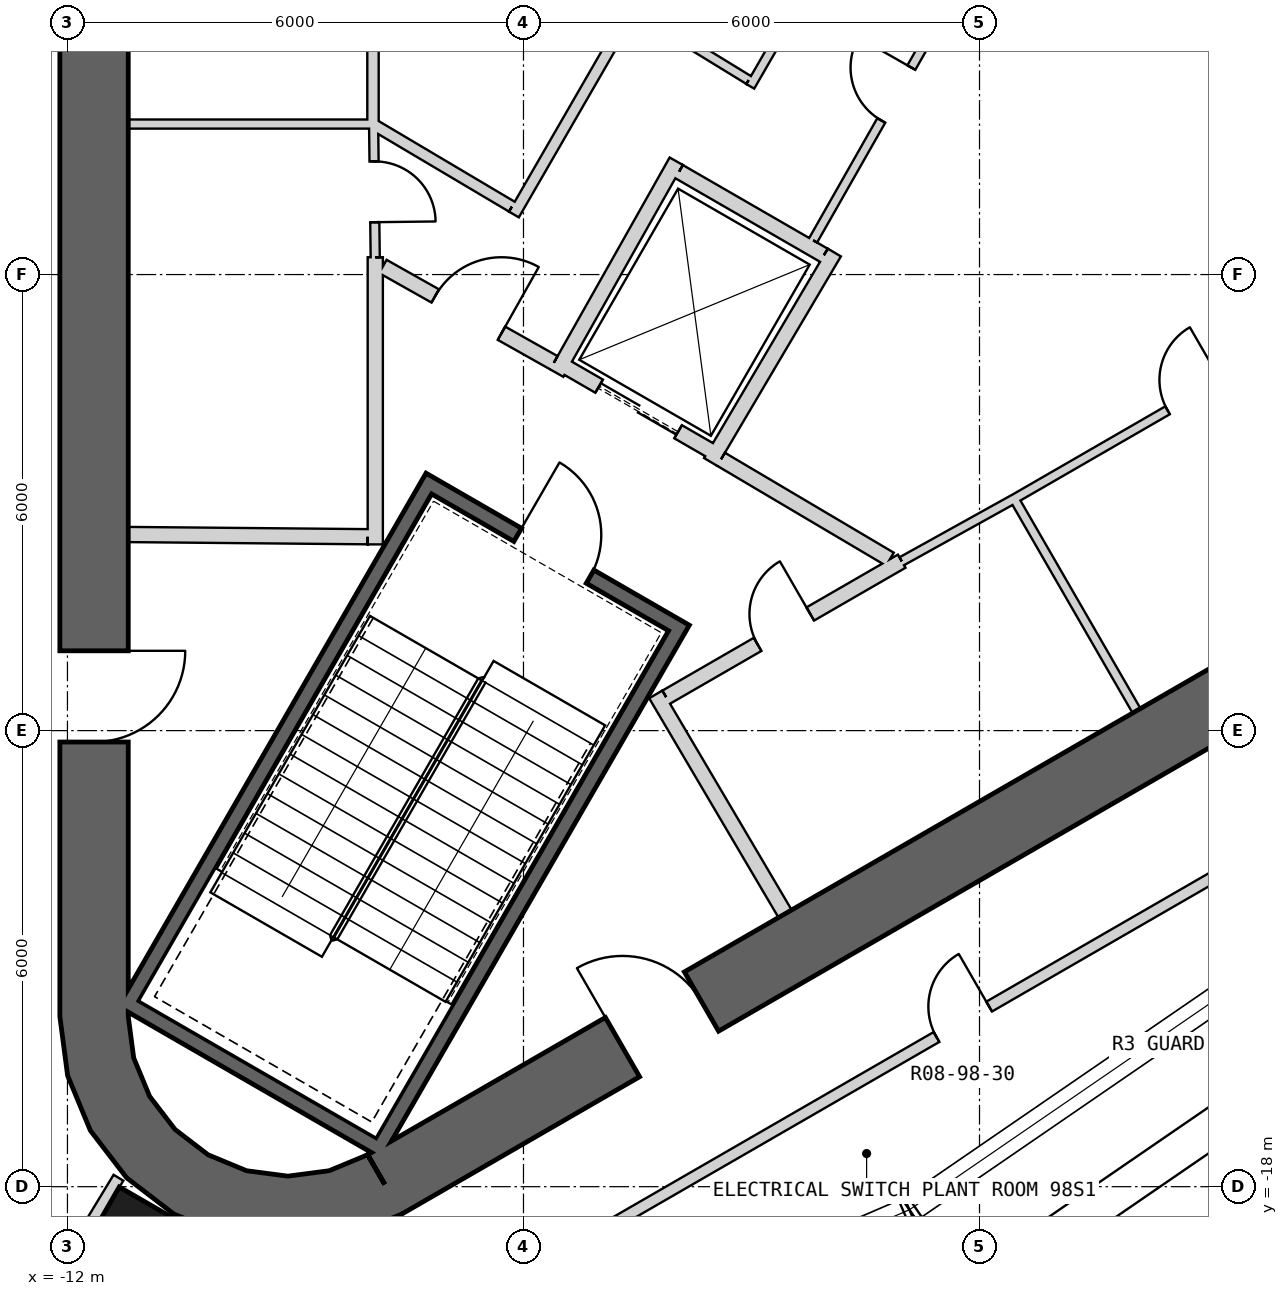
"""IFC4 building model, lengths in metres.
Left out: names, types, materials, properties, quantities, classifications, styles, units other than length and angle.
Written with IfcOpenShell. Run it as: python <this file> out.ifc"""

import sys

from ifc_helpers import new_model, si_unit, direction, frame, frame_2d, origin, origin_2d, place, context, subcontext, project, spatial, polyline, rectangle, outline, extrude, element, fill, save


model = new_model("IFC4")
c1 = context("Model", 3, precision=1e-05, world=origin(), true_north=direction((0.0, 1.0)))
c2 = subcontext(c1, "Body", "Model", "MODEL_VIEW")
j1 = project(units=[si_unit("LENGTHUNIT", "METRE"), si_unit("PLANEANGLEUNIT", "RADIAN")], contexts=[c1])
p1 = place(None, origin())
s1 = spatial("IfcSite", under=j1, at=p1, CompositionType="ELEMENT")
p2 = place(p1, origin())
s2 = spatial("IfcBuilding", under=s1, at=p2, CompositionType="ELEMENT")
p3 = place(p2, frame((0.0, 0.0, 435.3)))
s3 = spatial("IfcBuildingStorey", under=s2, at=p3, CompositionType="ELEMENT", Elevation=435.3)
p4 = place(p3, frame((-11.025, -19.097, 0.0), z_axis=(0.0, 0.0, 1.0), x_axis=(-0.5, -0.866025403784, 0.0)))
e1 = element("IfcColumn", 1, at=p4, inside=s3, PredefinedType="COLUMN", context=c2, shape_type="SweptSolid", body=[
    extrude(rectangle(XDim=1.6, YDim=1.6, at=origin_2d()), origin(), (0.0, 0.0, 1.0), 5.0),
])
p5 = place(p3, frame((-11.65, 15.762, 0.0), z_axis=(0.0, 0.0, 1.0), x_axis=(0.0, -1.0, 0.0)))
e2 = element("IfcWall", 2, at=p5, inside=s3, PredefinedType="SHEAR", context=c2, shape_type="SweptSolid", body=[
    extrude(rectangle(XDim=31.523, YDim=0.9, at=frame_2d((15.762, 0.0))), origin(), (0.0, 0.0, 1.0), 5.0),
])
p6 = place(p5, frame((3.612, 0.0, 0.0)))
e3 = element("IfcOpeningElement", 3, at=p6, cuts=e2, PredefinedType="OPENING", context=c2, shape_type="SweptSolid", body=[
    extrude(rectangle(XDim=1.2, YDim=2.4, at=frame_2d((0.6, 1.2))), frame((0.0, 0.46, 0.0), z_axis=(0.0, -1.0, 0.0), x_axis=(1.0, 0.0, 0.0)), (0.0, 0.0, 1.0), 0.92),
])
p7 = place(p5, frame((26.712, 0.0, 0.0)))
e4 = element("IfcOpeningElement", 4, at=p7, cuts=e2, PredefinedType="OPENING", context=c2, shape_type="SweptSolid", body=[
    extrude(rectangle(XDim=1.2, YDim=2.4, at=frame_2d((0.6, 1.2))), frame((0.0, 0.46, 0.0), z_axis=(0.0, -1.0, 0.0), x_axis=(1.0, 0.0, 0.0)), (0.0, 0.0, 1.0), 0.92),
])
p8 = place(p3, frame((-7.825, -17.97, 0.0), z_axis=(0.0, 0.0, 1.0), x_axis=(0.866028369851, 0.499994862586, 0.0)))
e5 = element("IfcWall", 5, at=p8, inside=s3, PredefinedType="SHEAR", context=c2, shape_type="SweptSolid", body=[
    extrude(rectangle(XDim=31.523, YDim=0.9, at=frame_2d((15.762, 0.0))), origin(), (0.0, 0.0, 1.0), 5.0),
])
p9 = place(p8, frame((17.862, 0.0, 0.0)))
e6 = element("IfcOpeningElement", 6, at=p9, cuts=e5, PredefinedType="OPENING", context=c2, shape_type="SweptSolid", body=[
    extrude(rectangle(XDim=1.2, YDim=2.4, at=frame_2d((0.6, 1.2))), frame((0.0, 0.46, 0.0), z_axis=(0.0, -1.0, 0.0), x_axis=(1.0, 0.0, 0.0)), (0.0, 0.0, 1.0), 0.92),
])
p10 = place(p8, frame((20.562, 0.0, 0.0)))
e7 = element("IfcOpeningElement", 7, at=p10, cuts=e5, PredefinedType="OPENING", context=c2, shape_type="SweptSolid", body=[
    extrude(rectangle(XDim=1.2, YDim=2.4, at=frame_2d((0.6, 1.2))), frame((0.0, 0.46, 0.0), z_axis=(0.0, -1.0, 0.0), x_axis=(1.0, 0.0, 0.0)), (0.0, 0.0, 1.0), 0.92),
])
p11 = place(p8, frame((26.712, 0.0, 0.0)))
e8 = element("IfcOpeningElement", 8, at=p11, cuts=e5, PredefinedType="OPENING", context=c2, shape_type="SweptSolid", body=[
    extrude(rectangle(XDim=1.2, YDim=2.4, at=frame_2d((0.6, 1.2))), frame((0.0, 0.46, 0.0), z_axis=(0.0, -1.0, 0.0), x_axis=(1.0, 0.0, 0.0)), (0.0, 0.0, 1.0), 0.92),
])
p12 = place(p8, frame((3.612, 0.0, 0.0)))
e9 = element("IfcOpeningElement", 9, at=p12, cuts=e5, PredefinedType="OPENING", context=c2, shape_type="SweptSolid", body=[
    extrude(rectangle(XDim=1.2, YDim=2.4, at=frame_2d((0.6, 1.2))), frame((0.0, 0.46, 0.0), z_axis=(0.0, -1.0, 0.0), x_axis=(1.0, 0.0, 0.0)), (0.0, 0.0, 1.0), 0.92),
])
p13 = place(p3, origin())
e10 = element("IfcWall", 10, at=p13, inside=s3, PredefinedType="SHEAR", context=c2, shape_type="SweptSolid", body=[
    extrude(outline(polyline([(-12.1, -15.762), (-11.998, -16.538), (-11.698, -17.262), (-11.221, -17.883), (-10.6, -18.36), (-9.876, -18.659), (-9.1, -18.762), (-8.323, -18.659), (-7.6, -18.36), (-8.05, -17.58), (-8.556, -17.79), (-9.1, -17.862), (-9.644, -17.79), (-10.15, -17.58), (-10.585, -17.247), (-10.919, -16.812), (-11.128, -16.305), (-11.2, -15.762), (-12.1, -15.762)])), origin(), (0.0, 0.0, 1.0), 5.0),
])
p14 = place(p3, frame((-3.905, -10.563, -0.25), z_axis=(0.0, 0.0, 1.0), x_axis=(-0.500012932018, -0.866017937352, 0.0)))
e11 = element("IfcWall", 11, at=p14, inside=s3, PredefinedType="SHEAR", context=c2, shape_type="SweptSolid", body=[
    extrude(rectangle(XDim=8.1, YDim=0.2, at=frame_2d((4.05, 0.0))), origin(), (0.0, 0.0, 1.0), 5.0),
])
p15 = place(p3, frame((-11.282, -15.541, -0.25), z_axis=(0.0, 0.0, 1.0), x_axis=(0.866000483506, -0.500043160704, 0.0)))
e12 = element("IfcWall", 12, at=p15, inside=s3, PredefinedType="SHEAR", context=c2, shape_type="SweptSolid", body=[
    extrude(rectangle(XDim=3.8, YDim=0.2, at=frame_2d((1.9, 0.0))), origin(), (0.0, 0.0, 1.0), 5.0),
])
p16 = place(p3, frame((-7.196, -8.663, -0.25), z_axis=(0.0, 0.0, 1.0), x_axis=(-0.499997992926, -0.866026562566, 0.0)))
e13 = element("IfcWall", 13, at=p16, inside=s3, PredefinedType="SHEAR", context=c2, shape_type="SweptSolid", body=[
    extrude(rectangle(XDim=7.9, YDim=0.2, at=frame_2d((3.95, 0.0))), origin(), (0.0, 0.0, 1.0), 5.0),
])
p17 = place(p3, frame((-4.041, -10.599, -0.25), z_axis=(0.0, 0.0, 1.0), x_axis=(-0.866047807691, 0.499961193289, 0.0)))
e14 = element("IfcWall", 14, at=p17, inside=s3, PredefinedType="SHEAR", context=c2, shape_type="SweptSolid", body=[
    extrude(rectangle(XDim=3.6, YDim=0.2, at=frame_2d((1.8, 0.0))), origin(), (0.0, 0.0, 1.0), 5.0),
])
p18 = place(p17, frame((1.25, 0.0, 0.25)))
e15 = element("IfcOpeningElement", 15, at=p18, cuts=e14, PredefinedType="OPENING", context=c2, shape_type="SweptSolid", body=[
    extrude(rectangle(XDim=1.1, YDim=2.1, at=frame_2d((0.55, 1.05))), frame((0.0, 0.11, 0.0), z_axis=(0.0, -1.0, 0.0), x_axis=(1.0, 0.0, 0.0)), (0.0, 0.0, 1.0), 0.22),
])
p19 = place(p3, frame((-3.446, -8.368, 0.0), z_axis=(0.0, 0.0, 1.0), x_axis=(-0.866024647952, 0.500001309137, 0.0)))
e16 = element("IfcWall", 16, at=p19, inside=s3, PredefinedType="PLUMBINGWALL", context=c2, shape_type="SweptSolid", body=[
    extrude(rectangle(XDim=2.4, YDim=0.2, at=frame_2d((1.2, 0.0))), origin(), (0.0, 0.0, 1.0), 4.75),
])
p20 = place(p19, frame((0.6, 0.0, 0.0)))
e17 = element("IfcOpeningElement", 17, at=p20, cuts=e16, PredefinedType="OPENING", context=c2, shape_type="SweptSolid", body=[
    extrude(rectangle(XDim=1.2, YDim=2.4, at=frame_2d((0.6, 1.2))), frame((0.0, 0.11, 0.0), z_axis=(0.0, -1.0, 0.0), x_axis=(1.0, 0.0, 0.0)), (0.0, 0.0, 1.0), 0.22),
])
p21 = place(p3, frame((-3.953, -4.646, 0.0), z_axis=(0.0, 0.0, 1.0), x_axis=(0.86605622881, -0.499946605688, 0.0)))
e18 = element("IfcWall", 18, at=p21, inside=s3, PredefinedType="PLUMBINGWALL", context=c2, shape_type="SweptSolid", body=[
    extrude(rectangle(XDim=2.2, YDim=0.2, at=frame_2d((1.1, 0.0))), origin(), (0.0, 0.0, 1.0), 4.75),
])
p22 = place(p3, frame((-1.91, -5.71, 0.0), z_axis=(0.0, 0.0, 1.0), x_axis=(-0.508616218331, -0.860993346345, 0.0)))
e19 = element("IfcWall", 19, at=p22, inside=s3, PredefinedType="PLUMBINGWALL", context=c2, shape_type="SweptSolid", body=[
    extrude(rectangle(XDim=3.2, YDim=0.2, at=frame_2d((1.6, 0.0))), origin(), (0.0, 0.0, 1.0), 4.75),
])
p23 = place(p3, frame((-3.99, -4.509, 0.0), z_axis=(0.0, 0.0, 1.0), x_axis=(-0.491358283181, -0.870957540612, 0.0)))
e20 = element("IfcWall", 20, at=p23, inside=s3, PredefinedType="PLUMBINGWALL", context=c2, shape_type="SweptSolid", body=[
    extrude(rectangle(XDim=3.2, YDim=0.2, at=frame_2d((1.6, 0.0))), origin(), (0.0, 0.0, 1.0), 4.75),
])
p24 = place(p3, frame((-7.95, -9.55, 0.0), z_axis=(0.0, 0.0, 1.0), x_axis=(0.0, 1.0, 0.0)))
e21 = element("IfcWall", 21, at=p24, inside=s3, PredefinedType="PARTITIONING", context=c2, shape_type="SweptSolid", body=[
    extrude(rectangle(XDim=3.778, YDim=0.2, at=frame_2d((1.889, 0.0))), origin(), (0.0, 0.0, 1.0), 4.75),
])
p25 = place(p3, frame((-7.98, 4.05, 0.0), z_axis=(0.0, 0.0, 1.0), x_axis=(0.0, -1.0, 0.0)))
e22 = element("IfcWall", 22, at=p25, inside=s3, PredefinedType="PLUMBINGWALL", context=c2, shape_type="SweptSolid", body=[
    extrude(rectangle(XDim=8.1, YDim=0.15, at=frame_2d((4.05, 0.0))), origin(), (0.0, 0.0, 1.0), 4.75),
])
p26 = place(p25, frame((2.3, 0.0, 0.0)))
e23 = element("IfcOpeningElement", 23, at=p26, cuts=e22, PredefinedType="OPENING", context=c2, shape_type="SweptSolid", body=[
    extrude(rectangle(XDim=0.8, YDim=2.1, at=frame_2d((0.4, 1.05))), frame((0.0, 0.085, 0.0), z_axis=(0.0, -1.0, 0.0), x_axis=(1.0, 0.0, 0.0)), (0.0, 0.0, 1.0), 0.17),
])
p27 = place(p3, frame((-7.95, -4.02, 0.0), z_axis=(0.0, 0.0, 1.0), x_axis=(-1.0, 0.0, 0.0)))
e24 = element("IfcWall", 24, at=p27, inside=s3, PredefinedType="PARTITIONING", context=c2, shape_type="SweptSolid", body=[
    extrude(rectangle(XDim=3.25, YDim=0.12, at=frame_2d((1.625, 0.0))), origin(), (0.0, 0.0, 1.0), 4.75),
])
p28 = place(p3, frame((-11.2, -9.42, 0.0), z_axis=(0.0, 0.0, 1.0), x_axis=(0.999957467379, -0.009222983926, 0.0)))
e25 = element("IfcWall", 25, at=p28, inside=s3, PredefinedType="PARTITIONING", context=c2, shape_type="SweptSolid", body=[
    extrude(rectangle(XDim=3.15, YDim=0.2, at=frame_2d((1.575, 0.0))), origin(), (0.0, 0.0, 1.0), 4.75),
])
p29 = place(p3, frame((-7.951, -5.772, 0.0), z_axis=(0.0, 0.0, 1.0), x_axis=(-0.012047318415, 0.999927428426, 0.0)))
e26 = element("IfcWall", 26, at=p29, inside=s3, PredefinedType="PARTITIONING", context=c2, shape_type="SweptSolid", body=[
    extrude(rectangle(XDim=1.723, YDim=0.12, at=frame_2d((0.861, 0.0))), origin(), (0.0, 0.0, 1.0), 4.75),
])
p30 = place(p29, frame((0.461, 0.0, 0.0)))
e27 = element("IfcOpeningElement", 27, at=p30, cuts=e26, PredefinedType="OPENING", context=c2, shape_type="SweptSolid", body=[
    extrude(rectangle(XDim=0.8, YDim=2.1, at=frame_2d((0.4, 1.05))), frame((0.0, 0.07, 0.0), z_axis=(0.0, -1.0, 0.0), x_axis=(1.0, 0.0, 0.0)), (0.0, 0.0, 1.0), 0.14),
])
p31 = place(p3, frame((2.067, -11.74, 0.0), z_axis=(0.0, 0.0, 1.0), x_axis=(-0.499984717929, 0.866034226713, 0.0)))
e28 = element("IfcWall", 28, at=p31, inside=s3, PredefinedType="PARTITIONING", context=c2, shape_type="SweptSolid", body=[
    extrude(rectangle(XDim=3.25, YDim=0.12, at=frame_2d((1.625, 0.0))), origin(), (0.0, 0.0, 1.0), 4.75),
])
p32 = place(p3, frame((-4.26, -11.524, 0.0), z_axis=(0.0, 0.0, 1.0), x_axis=(0.507997497166, -0.861358544901, 0.0)))
e29 = element("IfcWall", 29, at=p32, inside=s3, PredefinedType="PARTITIONING", context=c2, shape_type="SweptSolid", body=[
    extrude(rectangle(XDim=3.35, YDim=0.2, at=frame_2d((1.675, 0.0))), origin(), (0.0, 0.0, 1.0), 4.75),
])
p33 = place(p3, frame((-1.024, -9.771, 0.0), z_axis=(0.0, 0.0, 1.0), x_axis=(-0.866029903013, -0.499992207027, 0.0)))
e30 = element("IfcWall", 30, at=p33, inside=s3, PredefinedType="PARTITIONING", context=c2, shape_type="SweptSolid", body=[
    extrude(rectangle(XDim=3.578, YDim=0.2, at=frame_2d((1.789, 0.0))), origin(), (0.0, 0.0, 1.0), 4.75),
])
p34 = place(p33, frame((1.389, 0.0, 0.0)))
e31 = element("IfcOpeningElement", 31, at=p34, cuts=e30, PredefinedType="OPENING", context=c2, shape_type="SweptSolid", body=[
    extrude(rectangle(XDim=0.8, YDim=2.1, at=frame_2d((0.4, 1.05))), frame((0.0, 0.11, 0.0), z_axis=(0.0, -1.0, 0.0), x_axis=(1.0, 0.0, 0.0)), (0.0, 0.0, 1.0), 0.22),
])
p35 = place(p3, frame((-1.023, -9.772, 0.0), z_axis=(0.0, 0.0, 1.0), x_axis=(0.874290944206, 0.485402250592, 0.0)))
e32 = element("IfcWall", 32, at=p35, inside=s3, PredefinedType="PARTITIONING", context=c2, shape_type="SweptSolid", body=[
    extrude(rectangle(XDim=1.723, YDim=0.12, at=frame_2d((0.861, 0.0))), origin(), (0.0, 0.0, 1.0), 4.75),
])
p36 = place(p3, frame((0.483, -8.936, 0.0), z_axis=(0.0, 0.0, 1.0), x_axis=(0.866028230842, 0.499995103361, 0.0)))
e33 = element("IfcWall", 33, at=p36, inside=s3, PredefinedType="PARTITIONING", context=c2, shape_type="SweptSolid", body=[
    extrude(rectangle(XDim=5.4, YDim=0.12, at=frame_2d((2.7, 0.0))), origin(), (0.0, 0.0, 1.0), 4.75),
])
p37 = place(p36, frame((2.3, 0.0, 0.0)))
e34 = element("IfcOpeningElement", 34, at=p37, cuts=e33, PredefinedType="OPENING", context=c2, shape_type="SweptSolid", body=[
    extrude(rectangle(XDim=0.8, YDim=2.1, at=frame_2d((0.4, 1.05))), frame((0.0, 0.07, 0.0), z_axis=(0.0, -1.0, 0.0), x_axis=(1.0, 0.0, 0.0)), (0.0, 0.0, 1.0), 0.14),
])
p38 = place(p3, frame((-3.401, -8.43, 0.0), z_axis=(0.0, 0.0, 1.0), x_axis=(0.860630814782, -0.509229418482, 0.0)))
e35 = element("IfcWall", 35, at=p38, inside=s3, PredefinedType="PARTITIONING", context=c2, shape_type="SweptSolid", body=[
    extrude(rectangle(XDim=2.582, YDim=0.2, at=frame_2d((1.291, 0.0))), origin(), (0.0, 0.0, 1.0), 4.75),
])
p39 = place(p3, frame((-7.85, -5.893, 0.0), z_axis=(0.0, 0.0, 1.0), x_axis=(0.871350695252, -0.490660744185, 0.0)))
e36 = element("IfcWall", 36, at=p39, inside=s3, PredefinedType="PARTITIONING", context=c2, shape_type="SweptSolid", body=[
    extrude(rectangle(XDim=2.582, YDim=0.2, at=frame_2d((1.291, 0.0))), origin(), (0.0, 0.0, 1.0), 4.75),
])
p40 = place(p39, frame((0.791, 0.0, 0.0)))
e37 = element("IfcOpeningElement", 37, at=p40, cuts=e36, PredefinedType="OPENING", context=c2, shape_type="SweptSolid", body=[
    extrude(rectangle(XDim=1.0, YDim=2.1, at=frame_2d((0.5, 1.05))), frame((0.0, 0.11, 0.0), z_axis=(0.0, -1.0, 0.0), x_axis=(1.0, 0.0, 0.0)), (0.0, 0.0, 1.0), 0.22),
])
p41 = place(p3, frame((0.051, -1.611, 0.0), z_axis=(0.0, 0.0, 1.0), x_axis=(-0.49434454467, -0.869266053148, 0.0)))
e38 = element("IfcWall", 38, at=p41, inside=s3, PredefinedType="PARTITIONING", context=c2, shape_type="SweptSolid", body=[
    extrude(rectangle(XDim=4.53, YDim=0.12, at=frame_2d((2.265, 0.0))), origin(), (0.0, 0.0, 1.0), 4.75),
])
p42 = place(p41, frame((1.916, 0.0, 0.0)))
e39 = element("IfcOpeningElement", 39, at=p42, cuts=e38, PredefinedType="OPENING", context=c2, shape_type="SweptSolid", body=[
    extrude(rectangle(XDim=0.8, YDim=2.1, at=frame_2d((0.4, 1.05))), frame((0.0, 0.07, 0.0), z_axis=(0.0, -1.0, 0.0), x_axis=(1.0, 0.0, 0.0)), (0.0, 0.0, 1.0), 0.14),
])
p43 = place(p3, frame((-6.126, -5.21, 0.0), z_axis=(0.0, 0.0, 1.0), x_axis=(0.499990139034, 0.866031096941, 0.0)))
e40 = element("IfcWall", 40, at=p43, inside=s3, PredefinedType="PLUMBINGWALL", context=c2, shape_type="SweptSolid", body=[
    extrude(rectangle(XDim=3.0, YDim=0.15, at=frame_2d((1.5, 0.0))), origin(), (0.0, 0.0, 1.0), 4.75),
])
p44 = place(p3, frame((-7.95, -4.041, 0.0), z_axis=(0.0, 0.0, 1.0), x_axis=(0.860090281069, -0.510141851263, 0.0)))
e41 = element("IfcWall", 41, at=p44, inside=s3, PredefinedType="PLUMBINGWALL", context=c2, shape_type="SweptSolid", body=[
    extrude(rectangle(XDim=2.089, YDim=0.15, at=frame_2d((1.045, 0.0))), origin(), (0.0, 0.0, 1.0), 4.75),
])
p45 = place(p3, frame((-3.016, -3.524, 0.0), z_axis=(0.0, 0.0, 1.0), x_axis=(0.499988681553, 0.866031938394, 0.0)))
e42 = element("IfcWall", 42, at=p45, inside=s3, PredefinedType="PARTITIONING", context=c2, shape_type="SweptSolid", body=[
    extrude(rectangle(XDim=3.069, YDim=0.12, at=frame_2d((1.535, 0.0))), origin(), (0.0, 0.0, 1.0), 4.75),
])
p46 = place(p45, frame((1.165, 0.0, 0.0)))
e43 = element("IfcOpeningElement", 43, at=p46, cuts=e42, PredefinedType="OPENING", context=c2, shape_type="SweptSolid", body=[
    extrude(rectangle(XDim=0.8, YDim=2.1, at=frame_2d((0.4, 1.05))), frame((0.0, 0.07, 0.0), z_axis=(0.0, -1.0, 0.0), x_axis=(1.0, 0.0, 0.0)), (0.0, 0.0, 1.0), 0.14),
])
p47 = place(p3, frame((-3.87, -2.93, 0.0), z_axis=(0.0, 0.0, 1.0), x_axis=(0.852489850103, -0.522743776119, 0.0)))
e44 = element("IfcWall", 44, at=p47, inside=s3, PredefinedType="PARTITIONING", context=c2, shape_type="SweptSolid", body=[
    extrude(rectangle(XDim=0.977, YDim=0.12, at=frame_2d((0.488, 0.0))), origin(), (0.0, 0.0, 1.0), 4.75),
])
p48 = place(p3, frame((-12.091, -19.14, 0.0), z_axis=(0.0, 0.0, 1.0), x_axis=(0.518518801369, 0.855066227041, 0.0)))
e45 = element("IfcWall", 45, at=p48, inside=s3, PredefinedType="PLUMBINGWALL", context=c2, shape_type="SweptSolid", body=[
    extrude(rectangle(XDim=1.47, YDim=0.15, at=frame_2d((0.735, 0.0))), origin(), (0.0, 0.0, 1.0), 4.75),
])
p49 = place(p3, frame((-7.213, -19.868, 0.0), z_axis=(0.0, 0.0, 1.0), x_axis=(0.866026120779, 0.499998758127, 0.0)))
e46 = element("IfcWall", 46, at=p49, inside=s3, PredefinedType="PLUMBINGWALL", context=c2, shape_type="SweptSolid", body=[
    extrude(rectangle(XDim=16.062, YDim=0.15, at=frame_2d((8.031, 0.0))), origin(), (0.0, 0.0, 1.0), 4.75),
])
p50 = place(p49, frame((7.675, 0.0, 0.0)))
e47 = element("IfcOpeningElement", 47, at=p50, cuts=e46, PredefinedType="OPENING", context=c2, shape_type="SweptSolid", body=[
    extrude(rectangle(XDim=0.8, YDim=2.1, at=frame_2d((0.4, 1.05))), frame((0.0, 0.085, 0.0), z_axis=(0.0, -1.0, 0.0), x_axis=(1.0, 0.0, 0.0)), (0.0, 0.0, 1.0), 0.17),
])
p51 = place(p18, origin())
e48 = element("IfcDoor", 48, at=p51, inside=s3, OperationType="SINGLE_SWING_RIGHT", PredefinedType="USERDEFINED", context=c2, shape_type="SweptSolid", body=[
    extrude(rectangle(XDim=1.1, YDim=2.1, at=frame_2d((0.55, 1.05))), frame((0.0, 0.025, 0.0), z_axis=(0.0, -1.0, 0.0), x_axis=(1.0, 0.0, 0.0)), (0.0, 0.0, 1.0), 0.05),
])
fill(e15, e48)
p52 = place(p40, origin())
e49 = element("IfcDoor", 49, at=p52, inside=s3, OperationType="SINGLE_SWING_RIGHT", PredefinedType="USERDEFINED", context=c2, shape_type="SweptSolid", body=[
    extrude(rectangle(XDim=1.0, YDim=2.1, at=frame_2d((0.5, 1.05))), frame((0.0, 0.025, 0.0), z_axis=(0.0, -1.0, 0.0), x_axis=(1.0, 0.0, 0.0)), (0.0, 0.0, 1.0), 0.05),
])
fill(e37, e49)
p53 = place(p20, origin())
e50 = element("IfcDoor", 50, at=p53, inside=s3, OperationType="SLIDING_TO_LEFT", PredefinedType="USERDEFINED", context=c2, shape_type="SweptSolid", body=[
    extrude(rectangle(XDim=1.2, YDim=2.4, at=frame_2d((0.6, 1.2))), frame((0.0, 0.025, 0.0), z_axis=(0.0, -1.0, 0.0), x_axis=(1.0, 0.0, 0.0)), (0.0, 0.0, 1.0), 0.05),
])
fill(e17, e50)
p54 = place(p42, origin())
e51 = element("IfcDoor", 51, at=p54, inside=s3, OperationType="SINGLE_SWING_LEFT", PredefinedType="USERDEFINED", context=c2, shape_type="SweptSolid", body=[
    extrude(rectangle(XDim=0.8, YDim=2.1, at=frame_2d((0.4, 1.05))), frame((0.0, 0.025, 0.0), z_axis=(0.0, -1.0, 0.0), x_axis=(1.0, 0.0, 0.0)), (0.0, 0.0, 1.0), 0.05),
])
fill(e39, e51)
p55 = place(p30, origin())
e52 = element("IfcDoor", 52, at=p55, inside=s3, OperationType="SINGLE_SWING_LEFT", PredefinedType="USERDEFINED", context=c2, shape_type="SweptSolid", body=[
    extrude(rectangle(XDim=0.8, YDim=2.1, at=frame_2d((0.4, 1.05))), frame((0.0, 0.025, 0.0), z_axis=(0.0, -1.0, 0.0), x_axis=(1.0, 0.0, 0.0)), (0.0, 0.0, 1.0), 0.05),
])
fill(e27, e52)
p56 = place(p34, origin())
e53 = element("IfcDoor", 53, at=p56, inside=s3, OperationType="SINGLE_SWING_LEFT", PredefinedType="USERDEFINED", context=c2, shape_type="SweptSolid", body=[
    extrude(rectangle(XDim=0.8, YDim=2.1, at=frame_2d((0.4, 1.05))), frame((0.0, 0.025, 0.0), z_axis=(0.0, -1.0, 0.0), x_axis=(1.0, 0.0, 0.0)), (0.0, 0.0, 1.0), 0.05),
])
fill(e31, e53)
p57 = place(p37, origin())
e54 = element("IfcDoor", 54, at=p57, inside=s3, OperationType="SINGLE_SWING_RIGHT", PredefinedType="USERDEFINED", context=c2, shape_type="SweptSolid", body=[
    extrude(rectangle(XDim=0.8, YDim=2.1, at=frame_2d((0.4, 1.05))), frame((0.0, 0.025, 0.0), z_axis=(0.0, -1.0, 0.0), x_axis=(1.0, 0.0, 0.0)), (0.0, 0.0, 1.0), 0.05),
])
fill(e34, e54)
p58 = place(p50, origin())
e55 = element("IfcDoor", 55, at=p58, inside=s3, OperationType="SINGLE_SWING_RIGHT", PredefinedType="USERDEFINED", context=c2, shape_type="SweptSolid", body=[
    extrude(rectangle(XDim=0.8, YDim=2.1, at=frame_2d((0.4, 1.05))), frame((0.0, 0.025, 0.0), z_axis=(0.0, -1.0, 0.0), x_axis=(1.0, 0.0, 0.0)), (0.0, 0.0, 1.0), 0.05),
])
fill(e47, e55)
p59 = place(p7, origin())
e56 = element("IfcDoor", 56, at=p59, inside=s3, OperationType="SINGLE_SWING_LEFT", PredefinedType="USERDEFINED", context=c2, shape_type="SweptSolid", body=[
    extrude(rectangle(XDim=1.2, YDim=2.4, at=frame_2d((0.6, 1.2))), frame((0.0, 0.025, 0.0), z_axis=(0.0, -1.0, 0.0), x_axis=(1.0, 0.0, 0.0)), (0.0, 0.0, 1.0), 0.05),
])
fill(e4, e56)
p60 = place(p12, origin())
e57 = element("IfcDoor", 57, at=p60, inside=s3, OperationType="SINGLE_SWING_LEFT", PredefinedType="USERDEFINED", context=c2, shape_type="SweptSolid", body=[
    extrude(rectangle(XDim=1.2, YDim=2.4, at=frame_2d((0.6, 1.2))), frame((0.0, 0.025, 0.0), z_axis=(0.0, -1.0, 0.0), x_axis=(1.0, 0.0, 0.0)), (0.0, 0.0, 1.0), 0.05),
])
fill(e9, e57)
save(model, sys.argv[1])
